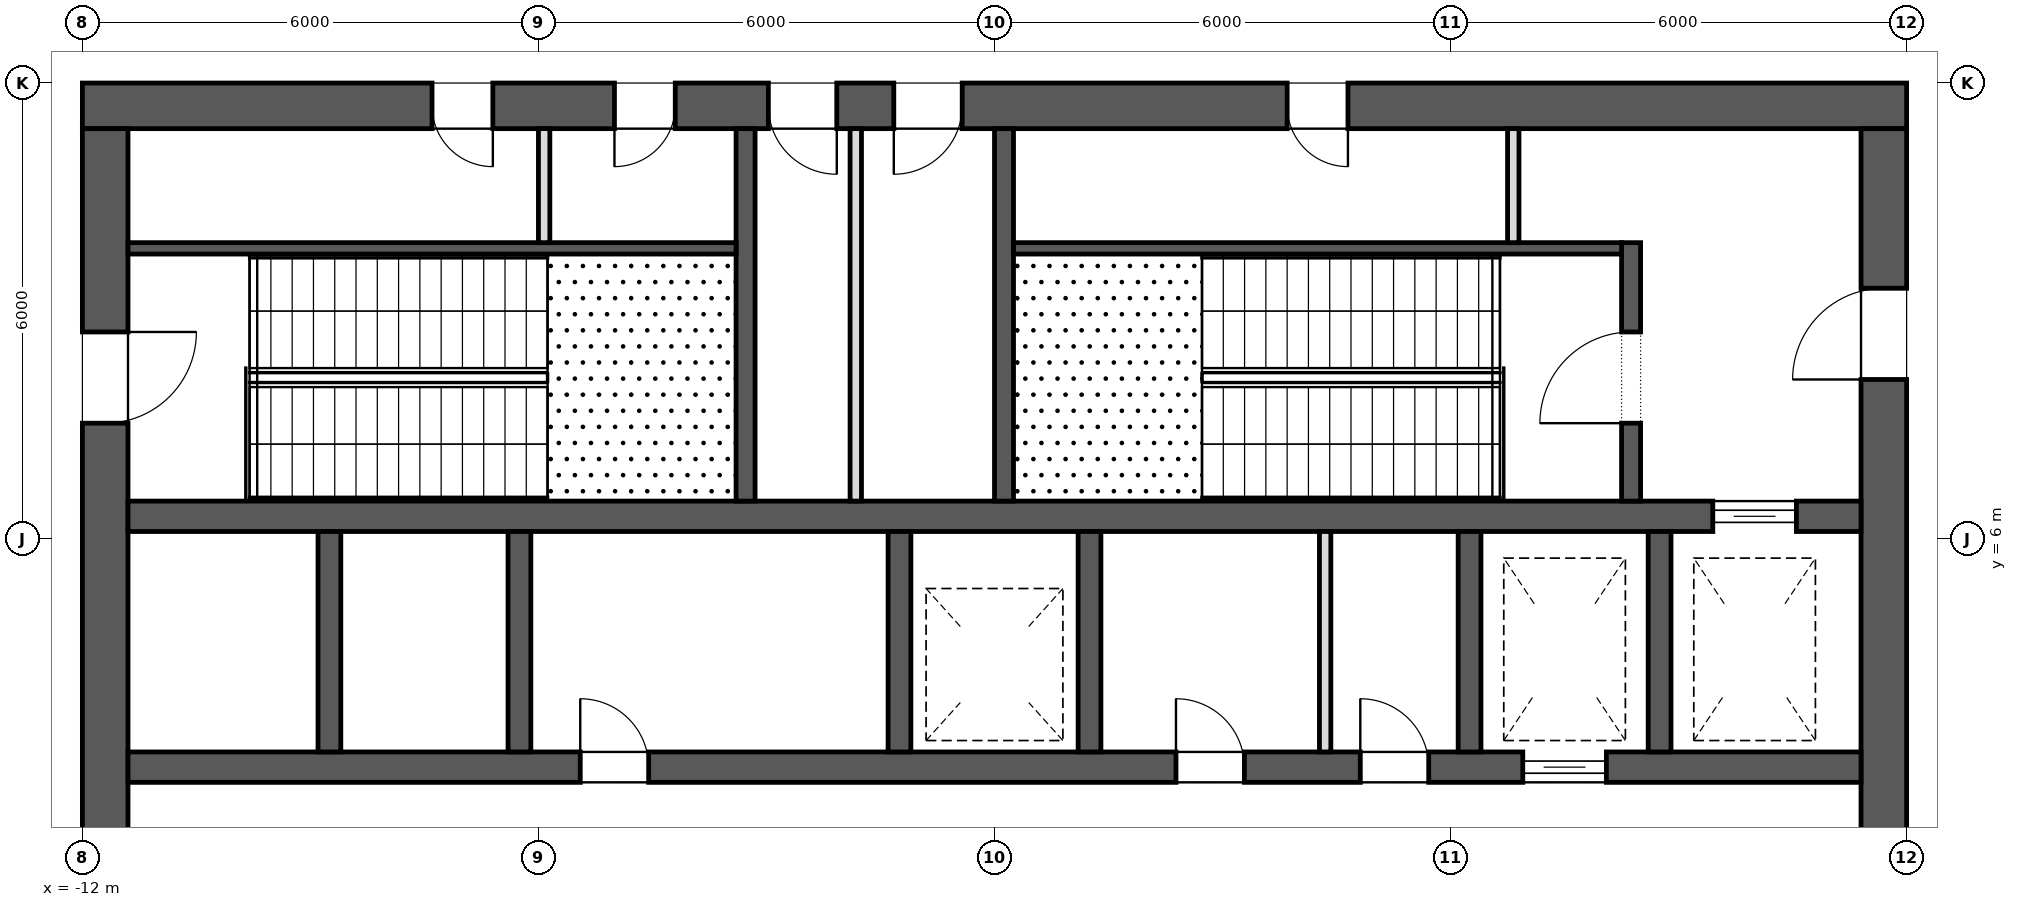
"""IFC4 building model, lengths in metres.
Left out: names, types, materials, properties, quantities, classifications, styles, units other than length and angle.
Written with IfcOpenShell. Run it as: python <this file> out.ifc"""

import sys

from ifc_helpers import new_model, si_unit, direction, frame, frame_2d, origin, place, context, subcontext, project, spatial, rectangle, extrude, element, fill, save


model = new_model("IFC4")
c1 = context("Model", 3, precision=1e-05, world=origin(), true_north=direction((0.0, 1.0)))
c2 = subcontext(c1, "Body", "Model", "MODEL_VIEW")
j1 = project(units=[si_unit("LENGTHUNIT", "METRE"), si_unit("PLANEANGLEUNIT", "RADIAN")], contexts=[c1])
p1 = place(None, origin())
s1 = spatial("IfcSite", under=j1, at=p1, CompositionType="ELEMENT")
p2 = place(p1, origin())
s2 = spatial("IfcBuilding", under=s1, at=p2, CompositionType="ELEMENT")
p3 = place(p2, frame((0.0, 0.0, 338.3)))
s3 = spatial("IfcBuildingStorey", under=s2, at=p3, CompositionType="ELEMENT", Elevation=338.3)
p4 = place(p3, frame((-12.0, 11.7, 0.0), z_axis=(0.0, 0.0, 1.0), x_axis=(1.0, 0.0, 0.0)))
e1 = element("IfcWall", 1, at=p4, inside=s3, PredefinedType="SHEAR", context=c2, shape_type="SweptSolid", body=[
    extrude(rectangle(XDim=24.0, YDim=0.6, at=frame_2d((12.0, 0.0))), origin(), (0.0, 0.0, 1.0), 5.0),
])
p5 = place(p4, frame((9.025, 0.0, 0.0)))
e2 = element("IfcOpeningElement", 2, at=p5, cuts=e1, PredefinedType="OPENING", context=c2, shape_type="SweptSolid", body=[
    extrude(rectangle(XDim=0.9, YDim=2.1, at=frame_2d((0.45, 1.05))), frame((0.0, 0.312, 0.0), z_axis=(0.0, -1.0, 0.0), x_axis=(1.0, 0.0, 0.0)), (0.0, 0.0, 1.0), 0.624),
])
p6 = place(p4, frame((10.675, 0.0, 0.0)))
e3 = element("IfcOpeningElement", 3, at=p6, cuts=e1, PredefinedType="OPENING", context=c2, shape_type="SweptSolid", body=[
    extrude(rectangle(XDim=0.9, YDim=2.1, at=frame_2d((0.45, 1.05))), frame((0.0, 0.312, 0.0), z_axis=(0.0, -1.0, 0.0), x_axis=(1.0, 0.0, 0.0)), (0.0, 0.0, 1.0), 0.624),
])
p7 = place(p4, frame((4.6, 0.0, 0.0)))
e4 = element("IfcOpeningElement", 4, at=p7, cuts=e1, PredefinedType="OPENING", context=c2, shape_type="SweptSolid", body=[
    extrude(rectangle(XDim=0.8, YDim=2.1, at=frame_2d((0.4, 1.05))), frame((0.0, 0.312, 0.0), z_axis=(0.0, -1.0, 0.0), x_axis=(1.0, 0.0, 0.0)), (0.0, 0.0, 1.0), 0.624),
])
p8 = place(p4, frame((7.0, 0.0, 0.0)))
e5 = element("IfcOpeningElement", 5, at=p8, cuts=e1, PredefinedType="OPENING", context=c2, shape_type="SweptSolid", body=[
    extrude(rectangle(XDim=0.8, YDim=2.1, at=frame_2d((0.4, 1.05))), frame((0.0, 0.312, 0.0), z_axis=(0.0, -1.0, 0.0), x_axis=(1.0, 0.0, 0.0)), (0.0, 0.0, 1.0), 0.624),
])
p9 = place(p4, frame((15.85, 0.0, 0.0)))
e6 = element("IfcOpeningElement", 6, at=p9, cuts=e1, PredefinedType="OPENING", context=c2, shape_type="SweptSolid", body=[
    extrude(rectangle(XDim=0.8, YDim=2.1, at=frame_2d((0.4, 1.05))), frame((0.0, 0.312, 0.0), z_axis=(0.0, -1.0, 0.0), x_axis=(1.0, 0.0, 0.0)), (0.0, 0.0, 1.0), 0.624),
])
p10 = place(p3, frame((11.7, -11.4, 0.0), z_axis=(0.0, 0.0, 1.0), x_axis=(0.0, 1.0, 0.0)))
e7 = element("IfcWall", 7, at=p10, inside=s3, PredefinedType="SHEAR", context=c2, shape_type="SweptSolid", body=[
    extrude(rectangle(XDim=22.8, YDim=0.6, at=frame_2d((11.4, 0.0))), origin(), (0.0, 0.0, 1.0), 5.0),
])
p11 = place(p10, frame((10.2, 0.0, 0.0)))
e8 = element("IfcOpeningElement", 8, at=p11, cuts=e7, PredefinedType="OPENING", context=c2, shape_type="SweptSolid", body=[
    extrude(rectangle(XDim=2.4, YDim=2.1, at=frame_2d((1.2, 1.05))), frame((0.0, 0.312, 0.0), z_axis=(0.0, -1.0, 0.0), x_axis=(1.0, 0.0, 0.0)), (0.0, 0.0, 1.0), 0.624),
])
p12 = place(p10, frame((19.5, 0.0, 0.0)))
e9 = element("IfcOpeningElement", 9, at=p12, cuts=e7, PredefinedType="OPENING", context=c2, shape_type="SweptSolid", body=[
    extrude(rectangle(XDim=1.2, YDim=2.1, at=frame_2d((0.6, 1.05))), frame((0.0, 0.312, 0.0), z_axis=(0.0, -1.0, 0.0), x_axis=(1.0, 0.0, 0.0)), (0.0, 0.0, 1.0), 0.624),
])
p13 = place(p10, frame((2.1, 0.0, 0.0)))
e10 = element("IfcOpeningElement", 10, at=p13, cuts=e7, PredefinedType="OPENING", context=c2, shape_type="SweptSolid", body=[
    extrude(rectangle(XDim=1.2, YDim=2.1, at=frame_2d((0.6, 1.05))), frame((0.0, 0.312, 0.0), z_axis=(0.0, -1.0, 0.0), x_axis=(1.0, 0.0, 0.0)), (0.0, 0.0, 1.0), 0.624),
])
p14 = place(p3, frame((-11.7, -11.4, 0.0), z_axis=(0.0, 0.0, 1.0), x_axis=(0.0, 1.0, 0.0)))
e11 = element("IfcWall", 11, at=p14, inside=s3, PredefinedType="SHEAR", context=c2, shape_type="SweptSolid", body=[
    extrude(rectangle(XDim=22.8, YDim=0.6, at=frame_2d((11.4, 0.0))), origin(), (0.0, 0.0, 1.0), 5.0),
])
p15 = place(p14, frame((10.2, 0.0, 0.0)))
e12 = element("IfcOpeningElement", 12, at=p15, cuts=e11, PredefinedType="OPENING", context=c2, shape_type="SweptSolid", body=[
    extrude(rectangle(XDim=2.4, YDim=2.1, at=frame_2d((1.2, 1.05))), frame((0.0, 0.312, 0.0), z_axis=(0.0, -1.0, 0.0), x_axis=(1.0, 0.0, 0.0)), (0.0, 0.0, 1.0), 0.624),
])
p16 = place(p14, frame((18.925, 0.0, 0.0)))
e13 = element("IfcOpeningElement", 13, at=p16, cuts=e11, PredefinedType="OPENING", context=c2, shape_type="SweptSolid", body=[
    extrude(rectangle(XDim=1.2, YDim=2.1, at=frame_2d((0.6, 1.05))), frame((0.0, 0.312, 0.0), z_axis=(0.0, -1.0, 0.0), x_axis=(1.0, 0.0, 0.0)), (0.0, 0.0, 1.0), 0.624),
])
p17 = place(p14, frame((2.675, 0.0, 0.0)))
e14 = element("IfcOpeningElement", 14, at=p17, cuts=e11, PredefinedType="OPENING", context=c2, shape_type="SweptSolid", body=[
    extrude(rectangle(XDim=1.2, YDim=2.1, at=frame_2d((0.6, 1.05))), frame((0.0, 0.312, 0.0), z_axis=(0.0, -1.0, 0.0), x_axis=(1.0, 0.0, 0.0)), (0.0, 0.0, 1.0), 0.624),
])
p18 = place(p3, frame((-11.4, 3.0, 0.0), z_axis=(0.0, 0.0, 1.0), x_axis=(1.0, 0.0, 0.0)))
e15 = element("IfcWall", 15, at=p18, inside=s3, PredefinedType="SHEAR", context=c2, shape_type="SweptSolid", body=[
    extrude(rectangle(XDim=22.8, YDim=0.4, at=frame_2d((11.4, 0.0))), origin(), (0.0, 0.0, 1.0), 5.0),
])
p19 = place(p18, frame((18.35, 0.0, 0.0)))
e16 = element("IfcOpeningElement", 16, at=p19, cuts=e15, PredefinedType="OPENING", context=c2, shape_type="SweptSolid", body=[
    extrude(rectangle(XDim=1.1, YDim=2.1, at=frame_2d((0.55, 1.05))), frame((0.0, 0.212, 0.0), z_axis=(0.0, -1.0, 0.0), x_axis=(1.0, 0.0, 0.0)), (0.0, 0.0, 1.0), 0.424),
])
p20 = place(p18, frame((13.788, 0.0, 0.0)))
e17 = element("IfcOpeningElement", 17, at=p20, cuts=e15, PredefinedType="OPENING", context=c2, shape_type="SweptSolid", body=[
    extrude(rectangle(XDim=0.9, YDim=2.1, at=frame_2d((0.45, 1.05))), frame((0.0, 0.212, 0.0), z_axis=(0.0, -1.0, 0.0), x_axis=(1.0, 0.0, 0.0)), (0.0, 0.0, 1.0), 0.424),
])
p21 = place(p18, frame((16.212, 0.0, 0.0)))
e18 = element("IfcOpeningElement", 18, at=p21, cuts=e15, PredefinedType="OPENING", context=c2, shape_type="SweptSolid", body=[
    extrude(rectangle(XDim=0.9, YDim=2.1, at=frame_2d((0.45, 1.05))), frame((0.0, 0.212, 0.0), z_axis=(0.0, -1.0, 0.0), x_axis=(1.0, 0.0, 0.0)), (0.0, 0.0, 1.0), 0.424),
])
p22 = place(p18, frame((5.95, 0.0, 0.0)))
e19 = element("IfcOpeningElement", 19, at=p22, cuts=e15, PredefinedType="OPENING", context=c2, shape_type="SweptSolid", body=[
    extrude(rectangle(XDim=0.9, YDim=2.1, at=frame_2d((0.45, 1.05))), frame((0.0, 0.212, 0.0), z_axis=(0.0, -1.0, 0.0), x_axis=(1.0, 0.0, 0.0)), (0.0, 0.0, 1.0), 0.424),
])
p23 = place(p3, frame((-11.4, 6.3, 0.0), z_axis=(0.0, 0.0, 1.0), x_axis=(1.0, 0.0, 0.0)))
e20 = element("IfcWall", 20, at=p23, inside=s3, PredefinedType="SHEAR", context=c2, shape_type="SweptSolid", body=[
    extrude(rectangle(XDim=22.8, YDim=0.4, at=frame_2d((11.4, 0.0))), origin(), (0.0, 0.0, 1.0), 5.0),
])
p24 = place(p23, frame((20.85, 0.0, 0.0)))
e21 = element("IfcOpeningElement", 21, at=p24, cuts=e20, PredefinedType="OPENING", context=c2, shape_type="SweptSolid", body=[
    extrude(rectangle(XDim=1.1, YDim=2.1, at=frame_2d((0.55, 1.05))), frame((0.0, 0.212, 0.0), z_axis=(0.0, -1.0, 0.0), x_axis=(1.0, 0.0, 0.0)), (0.0, 0.0, 1.0), 0.424),
])
for number, where, z_axis, x_axis in (
    (22, (-8.75, 3.2, 0.0), (0.0, 0.0, 1.0), (0.0, 1.0, 0.0)),
    (23, (-6.25, 3.2, 0.0), (0.0, 0.0, 1.0), (0.0, 1.0, 0.0)),
    (24, (-1.25, 3.2, 0.0), (0.0, 0.0, 1.0), (0.0, 1.0, 0.0)),
    (25, (1.25, 3.2, 0.0), (0.0, 0.0, 1.0), (0.0, 1.0, 0.0)),
    (26, (6.25, 3.2, 0.0), (0.0, 0.0, 1.0), (0.0, 1.0, 0.0)),
    (27, (8.75, 3.2, 0.0), (0.0, 0.0, 1.0), (0.0, 1.0, 0.0)),
):
    element("IfcWall", number, at=place(p3, frame(where, z_axis=z_axis, x_axis=x_axis)), inside=s3, PredefinedType="SHEAR", context=c2, shape_type="SweptSolid", body=[
        extrude(rectangle(XDim=2.9, YDim=0.3, at=frame_2d((1.45, 0.0))), origin(), (0.0, 0.0, 1.0), 5.0),
    ])
for number, where, z_axis, x_axis in (
    (28, (-3.275, 6.5, 0.0), (0.0, 0.0, 1.0), (0.0, 1.0, 0.0)),
    (29, (0.125, 6.5, 0.0), (0.0, 0.0, 1.0), (0.0, 1.0, 0.0)),
):
    element("IfcWall", number, at=place(p3, frame(where, z_axis=z_axis, x_axis=x_axis)), inside=s3, PredefinedType="SHEAR", context=c2, shape_type="SweptSolid", body=[
        extrude(rectangle(XDim=4.9, YDim=0.25, at=frame_2d((2.45, 0.0))), origin(), (0.0, 0.0, 1.0), 4.65),
    ])
p25 = place(p3, frame((8.375, 6.5, 0.0), z_axis=(0.0, 0.0, 1.0), x_axis=(0.0, 1.0, 0.0)))
e30 = element("IfcWall", 30, at=p25, inside=s3, PredefinedType="SHEAR", context=c2, shape_type="SweptSolid", body=[
    extrude(rectangle(XDim=3.4, YDim=0.25, at=frame_2d((1.7, 0.0))), origin(), (0.0, 0.0, 1.0), 4.65),
])
p26 = place(p25, frame((1.025, 0.0, 0.0)))
e31 = element("IfcOpeningElement", 31, at=p26, cuts=e30, PredefinedType="OPENING", context=c2, shape_type="SweptSolid", body=[
    extrude(rectangle(XDim=1.2, YDim=2.1, at=frame_2d((0.6, 1.05))), frame((0.0, 0.137, 0.0), z_axis=(0.0, -1.0, 0.0), x_axis=(1.0, 0.0, 0.0)), (0.0, 0.0, 1.0), 0.274),
])
for number, where, z_axis, x_axis in (
    (32, (-11.4, 9.825, 0.0), (0.0, 0.0, 1.0), (1.0, 0.0, 0.0)),
    (33, (0.25, 9.825, 0.0), (0.0, 0.0, 1.0), (1.0, 0.0, 0.0)),
):
    element("IfcWall", number, at=place(p3, frame(where, z_axis=z_axis, x_axis=x_axis)), inside=s3, PredefinedType="SHEAR", context=c2, shape_type="SweptSolid", body=[
        extrude(rectangle(XDim=8.0, YDim=0.15, at=frame_2d((4.0, 0.0))), origin(), (0.0, 0.0, 1.0), 4.65),
    ])
p27 = place(p3, frame((-1.825, 6.5, 0.0), z_axis=(0.0, 0.0, 1.0), x_axis=(0.0, 1.0, 0.0)))
e34 = element("IfcWall", 34, at=p27, inside=s3, PredefinedType="PARTITIONING", context=c2, shape_type="SweptSolid", body=[
    extrude(rectangle(XDim=4.9, YDim=0.15, at=frame_2d((2.45, 0.0))), origin(), (0.0, 0.0, 1.0), 4.65),
])
for number, where, z_axis, x_axis in (
    (35, (-5.925, 9.9, 0.0), (0.0, 0.0, 1.0), (0.0, 1.0, 0.0)),
    (36, (6.825, 9.9, 0.0), (0.0, 0.0, 1.0), (0.0, 1.0, 0.0)),
):
    element("IfcWall", number, at=place(p3, frame(where, z_axis=z_axis, x_axis=x_axis)), inside=s3, PredefinedType="PARTITIONING", context=c2, shape_type="SweptSolid", body=[
        extrude(rectangle(XDim=1.5, YDim=0.15, at=frame_2d((0.75, 0.0))), origin(), (0.0, 0.0, 1.0), 4.65),
    ])
p28 = place(p3, frame((4.35, 3.2, 0.0), z_axis=(0.0, 0.0, 1.0), x_axis=(0.0, 1.0, 0.0)))
e37 = element("IfcWall", 37, at=p28, inside=s3, PredefinedType="PARTITIONING", context=c2, shape_type="SweptSolid", body=[
    extrude(rectangle(XDim=2.9, YDim=0.15, at=frame_2d((1.45, 0.0))), origin(), (0.0, 0.0, 1.0), 4.65),
])
p29 = place(p24, origin())
e38 = element("IfcDoor", 38, at=p29, inside=s3, OperationType="SLIDING_TO_LEFT", PredefinedType="DOOR", context=c2, shape_type="SweptSolid", body=[
    extrude(rectangle(XDim=1.1, YDim=2.1, at=frame_2d((0.55, 1.05))), frame((0.0, 0.025, 0.0), z_axis=(0.0, -1.0, 0.0), x_axis=(1.0, 0.0, 0.0)), (0.0, 0.0, 1.0), 0.05),
])
fill(e21, e38)
p30 = place(p19, origin())
e39 = element("IfcDoor", 39, at=p30, inside=s3, OperationType="SLIDING_TO_LEFT", PredefinedType="DOOR", context=c2, shape_type="SweptSolid", body=[
    extrude(rectangle(XDim=1.1, YDim=2.1, at=frame_2d((0.55, 1.05))), frame((0.0, 0.025, 0.0), z_axis=(0.0, -1.0, 0.0), x_axis=(1.0, 0.0, 0.0)), (0.0, 0.0, 1.0), 0.05),
])
fill(e16, e39)
p31 = place(p16, frame((1.2, 0.0, 0.0), z_axis=(0.0, 0.0, 1.0), x_axis=(-1.0, 0.0, 0.0)))
e40 = element("IfcDoor", 40, at=p31, inside=s3, OperationType="SINGLE_SWING_RIGHT", PredefinedType="DOOR", context=c2, shape_type="SweptSolid", body=[
    extrude(rectangle(XDim=1.2, YDim=2.1, at=frame_2d((0.6, 1.05))), frame((0.0, 0.025, 0.0), z_axis=(0.0, -1.0, 0.0), x_axis=(1.0, 0.0, 0.0)), (0.0, 0.0, 1.0), 0.05),
])
fill(e13, e40)
p32 = place(p26, origin())
e41 = element("IfcDoor", 41, at=p32, inside=s3, OperationType="SINGLE_SWING_RIGHT", PredefinedType="DOOR", context=c2, shape_type="SweptSolid", body=[
    extrude(rectangle(XDim=1.2, YDim=2.1, at=frame_2d((0.6, 1.05))), frame((0.0, 0.025, 0.0), z_axis=(0.0, -1.0, 0.0), x_axis=(1.0, 0.0, 0.0)), (0.0, 0.0, 1.0), 0.05),
])
fill(e31, e41)
p33 = place(p12, origin())
e42 = element("IfcDoor", 42, at=p33, inside=s3, OperationType="SINGLE_SWING_RIGHT", PredefinedType="DOOR", context=c2, shape_type="SweptSolid", body=[
    extrude(rectangle(XDim=1.2, YDim=2.1, at=frame_2d((0.6, 1.05))), frame((0.0, 0.025, 0.0), z_axis=(0.0, -1.0, 0.0), x_axis=(1.0, 0.0, 0.0)), (0.0, 0.0, 1.0), 0.05),
])
fill(e9, e42)
p34 = place(p5, frame((0.9, 0.0, 0.0), z_axis=(0.0, 0.0, 1.0), x_axis=(-1.0, 0.0, 0.0)))
e43 = element("IfcDoor", 43, at=p34, inside=s3, OperationType="SINGLE_SWING_RIGHT", PredefinedType="DOOR", context=c2, shape_type="SweptSolid", body=[
    extrude(rectangle(XDim=0.9, YDim=2.1, at=frame_2d((0.45, 1.05))), frame((0.0, 0.025, 0.0), z_axis=(0.0, -1.0, 0.0), x_axis=(1.0, 0.0, 0.0)), (0.0, 0.0, 1.0), 0.05),
])
fill(e2, e43)
p35 = place(p6, frame((0.9, 0.0, 0.0), z_axis=(0.0, 0.0, 1.0), x_axis=(-1.0, 0.0, 0.0)))
e44 = element("IfcDoor", 44, at=p35, inside=s3, OperationType="SINGLE_SWING_LEFT", PredefinedType="DOOR", context=c2, shape_type="SweptSolid", body=[
    extrude(rectangle(XDim=0.9, YDim=2.1, at=frame_2d((0.45, 1.05))), frame((0.0, 0.025, 0.0), z_axis=(0.0, -1.0, 0.0), x_axis=(1.0, 0.0, 0.0)), (0.0, 0.0, 1.0), 0.05),
])
fill(e3, e44)
p36 = place(p7, frame((0.8, 0.0, 0.0), z_axis=(0.0, 0.0, 1.0), x_axis=(-1.0, 0.0, 0.0)))
e45 = element("IfcDoor", 45, at=p36, inside=s3, OperationType="SINGLE_SWING_RIGHT", PredefinedType="DOOR", context=c2, shape_type="SweptSolid", body=[
    extrude(rectangle(XDim=0.8, YDim=2.1, at=frame_2d((0.4, 1.05))), frame((0.0, 0.025, 0.0), z_axis=(0.0, -1.0, 0.0), x_axis=(1.0, 0.0, 0.0)), (0.0, 0.0, 1.0), 0.05),
])
fill(e4, e45)
p37 = place(p8, frame((0.8, 0.0, 0.0), z_axis=(0.0, 0.0, 1.0), x_axis=(-1.0, 0.0, 0.0)))
e46 = element("IfcDoor", 46, at=p37, inside=s3, OperationType="SINGLE_SWING_LEFT", PredefinedType="DOOR", context=c2, shape_type="SweptSolid", body=[
    extrude(rectangle(XDim=0.8, YDim=2.1, at=frame_2d((0.4, 1.05))), frame((0.0, 0.025, 0.0), z_axis=(0.0, -1.0, 0.0), x_axis=(1.0, 0.0, 0.0)), (0.0, 0.0, 1.0), 0.05),
])
fill(e5, e46)
p38 = place(p9, frame((0.8, 0.0, 0.0), z_axis=(0.0, 0.0, 1.0), x_axis=(-1.0, 0.0, 0.0)))
e47 = element("IfcDoor", 47, at=p38, inside=s3, OperationType="SINGLE_SWING_RIGHT", PredefinedType="DOOR", context=c2, shape_type="SweptSolid", body=[
    extrude(rectangle(XDim=0.8, YDim=2.1, at=frame_2d((0.4, 1.05))), frame((0.0, 0.025, 0.0), z_axis=(0.0, -1.0, 0.0), x_axis=(1.0, 0.0, 0.0)), (0.0, 0.0, 1.0), 0.05),
])
fill(e6, e47)
p39 = place(p20, origin())
e48 = element("IfcDoor", 48, at=p39, inside=s3, OperationType="SINGLE_SWING_RIGHT", PredefinedType="DOOR", context=c2, shape_type="SweptSolid", body=[
    extrude(rectangle(XDim=0.9, YDim=2.1, at=frame_2d((0.45, 1.05))), frame((0.0, 0.025, 0.0), z_axis=(0.0, -1.0, 0.0), x_axis=(1.0, 0.0, 0.0)), (0.0, 0.0, 1.0), 0.05),
])
fill(e17, e48)
p40 = place(p21, origin())
e49 = element("IfcDoor", 49, at=p40, inside=s3, OperationType="SINGLE_SWING_RIGHT", PredefinedType="DOOR", context=c2, shape_type="SweptSolid", body=[
    extrude(rectangle(XDim=0.9, YDim=2.1, at=frame_2d((0.45, 1.05))), frame((0.0, 0.025, 0.0), z_axis=(0.0, -1.0, 0.0), x_axis=(1.0, 0.0, 0.0)), (0.0, 0.0, 1.0), 0.05),
])
fill(e18, e49)
p41 = place(p22, origin())
e50 = element("IfcDoor", 50, at=p41, inside=s3, OperationType="SINGLE_SWING_RIGHT", PredefinedType="DOOR", context=c2, shape_type="SweptSolid", body=[
    extrude(rectangle(XDim=0.9, YDim=2.1, at=frame_2d((0.45, 1.05))), frame((0.0, 0.025, 0.0), z_axis=(0.0, -1.0, 0.0), x_axis=(1.0, 0.0, 0.0)), (0.0, 0.0, 1.0), 0.05),
])
fill(e19, e50)
save(model, sys.argv[1])
